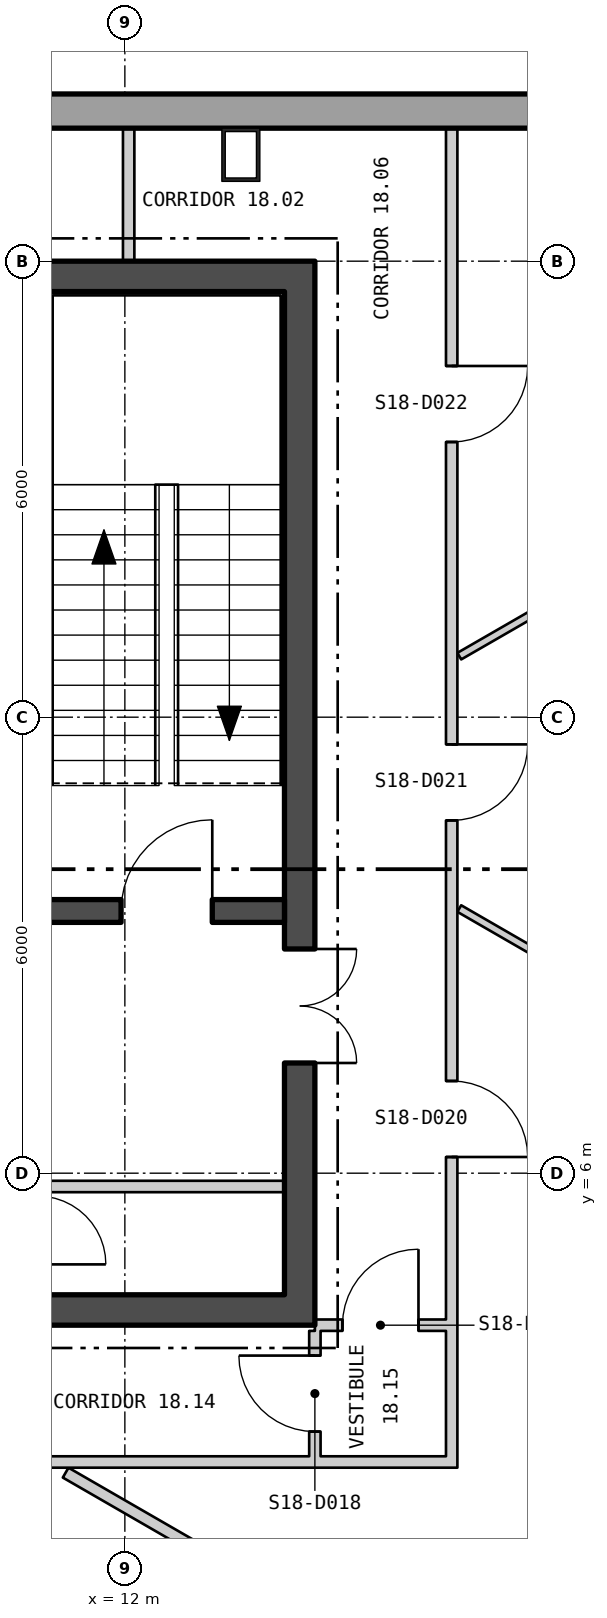
"""IFC4 building model, lengths in metres.
Left out: names, types, materials, properties, quantities, classifications, styles, units other than length and angle.
Written with IfcOpenShell. Run it as: python <this file> out.ifc"""

import sys

from ifc_helpers import new_model, si_unit, direction, frame, frame_2d, origin, origin_2d, place, context, subcontext, project, spatial, polyline, rectangle, hollow_rectangle, outline, extrude, element, fill, save


model = new_model("IFC4")
c1 = context("Model", 3, precision=1e-05, world=origin(), true_north=direction((0.0, 1.0)))
c2 = subcontext(c1, "Body", "Model", "MODEL_VIEW")
j1 = project(units=[si_unit("LENGTHUNIT", "METRE"), si_unit("PLANEANGLEUNIT", "RADIAN")], contexts=[c1])
p1 = place(None, origin())
s1 = spatial("IfcSite", under=j1, at=p1, CompositionType="ELEMENT")
p2 = place(p1, origin())
s2 = spatial("IfcBuilding", under=s1, at=p2, CompositionType="ELEMENT")
p3 = place(p2, frame((0.0, 0.0, 245.4)))
s3 = spatial("IfcBuildingStorey", under=s2, at=p3, CompositionType="ELEMENT", Elevation=245.4)
p4 = place(p3, frame((13.526, 19.4, 0.0), z_axis=(0.0, 0.0, 1.0), x_axis=(-1.0, 0.0, 0.0)))
e1 = element("IfcColumn", 1, at=p4, inside=s3, PredefinedType="COLUMN", context=c2, shape_type="SweptSolid", body=[
    extrude(hollow_rectangle(XDim=0.5, YDim=0.7, WallThickness=0.045, at=origin_2d()), origin(), (0.0, 0.0, 1.0), 3.9),
])
p5 = place(p3, frame((22.875, 19.975, -0.4), z_axis=(0.0, 0.0, 1.0), x_axis=(-1.0, 0.0, 0.0)))
e2 = element("IfcWall", 2, at=p5, inside=s3, PredefinedType="SOLIDWALL", context=c2, shape_type="SweptSolid", body=[
    extrude(outline(polyline([(-0.13, -0.225), (45.88, -0.225), (45.62, 0.225), (0.13, 0.225), (-0.13, -0.225)])), origin(), (0.0, 0.0, 1.0), 3.9),
])
p6 = place(p5, frame((1.425, 0.0, 1.3)))
e3 = element("IfcOpeningElement", 3, at=p6, cuts=e2, PredefinedType="OPENING", context=c2, shape_type="SweptSolid", body=[
    extrude(rectangle(XDim=2.4, YDim=2.0, at=frame_2d((1.2, 1.0))), frame((0.0, 0.235, 0.0), z_axis=(0.0, -1.0, 0.0), x_axis=(1.0, 0.0, 0.0)), (0.0, 0.0, 1.0), 0.47),
])
p7 = place(p5, frame((14.912, 0.0, 1.3)))
e4 = element("IfcOpeningElement", 4, at=p7, cuts=e2, PredefinedType="OPENING", context=c2, shape_type="SweptSolid", body=[
    extrude(rectangle(XDim=2.4, YDim=2.0, at=frame_2d((1.2, 1.0))), frame((0.0, 0.235, 0.0), z_axis=(0.0, -1.0, 0.0), x_axis=(1.0, 0.0, 0.0)), (0.0, 0.0, 1.0), 0.47),
])
p8 = place(p5, frame((19.421, 0.0, 1.3)))
e5 = element("IfcOpeningElement", 5, at=p8, cuts=e2, PredefinedType="OPENING", context=c2, shape_type="SweptSolid", body=[
    extrude(rectangle(XDim=2.4, YDim=2.0, at=frame_2d((1.2, 1.0))), frame((0.0, 0.235, 0.0), z_axis=(0.0, -1.0, 0.0), x_axis=(1.0, 0.0, 0.0)), (0.0, 0.0, 1.0), 0.47),
])
p9 = place(p5, frame((23.929, 0.0, 1.3)))
e6 = element("IfcOpeningElement", 6, at=p9, cuts=e2, PredefinedType="OPENING", context=c2, shape_type="SweptSolid", body=[
    extrude(rectangle(XDim=2.4, YDim=2.0, at=frame_2d((1.2, 1.0))), frame((0.0, 0.235, 0.0), z_axis=(0.0, -1.0, 0.0), x_axis=(1.0, 0.0, 0.0)), (0.0, 0.0, 1.0), 0.47),
])
p10 = place(p5, frame((28.438, 0.0, 1.3)))
e7 = element("IfcOpeningElement", 7, at=p10, cuts=e2, PredefinedType="OPENING", context=c2, shape_type="SweptSolid", body=[
    extrude(rectangle(XDim=2.4, YDim=2.0, at=frame_2d((1.2, 1.0))), frame((0.0, 0.235, 0.0), z_axis=(0.0, -1.0, 0.0), x_axis=(1.0, 0.0, 0.0)), (0.0, 0.0, 1.0), 0.47),
])
p11 = place(p5, frame((32.947, 0.0, 1.3)))
e8 = element("IfcOpeningElement", 8, at=p11, cuts=e2, PredefinedType="OPENING", context=c2, shape_type="SweptSolid", body=[
    extrude(rectangle(XDim=2.4, YDim=2.0, at=frame_2d((1.2, 1.0))), frame((0.0, 0.235, 0.0), z_axis=(0.0, -1.0, 0.0), x_axis=(1.0, 0.0, 0.0)), (0.0, 0.0, 1.0), 0.47),
])
p12 = place(p5, frame((41.925, 0.0, 1.3)))
e9 = element("IfcOpeningElement", 9, at=p12, cuts=e2, PredefinedType="OPENING", context=c2, shape_type="SweptSolid", body=[
    extrude(rectangle(XDim=2.4, YDim=2.0, at=frame_2d((1.2, 1.0))), frame((0.0, 0.235, 0.0), z_axis=(0.0, -1.0, 0.0), x_axis=(1.0, 0.0, 0.0)), (0.0, 0.0, 1.0), 0.47),
])
p13 = place(p3, frame((2.975, -24.799, -0.18), z_axis=(0.0, 0.0, 1.0), x_axis=(0.500000335318, 0.866025210188, 0.0)))
e10 = element("IfcWall", 10, at=p13, inside=s3, PredefinedType="SOLIDWALL", context=c2, shape_type="SweptSolid", body=[
    extrude(outline(polyline([(-0.13, -0.225), (45.88, -0.225), (45.62, 0.225), (0.13, 0.225), (-0.13, -0.225)])), origin(), (0.0, 0.0, 1.0), 3.68),
])
p14 = place(p13, frame((1.425, 0.0, 1.08)))
e11 = element("IfcOpeningElement", 11, at=p14, cuts=e10, PredefinedType="OPENING", context=c2, shape_type="SweptSolid", body=[
    extrude(rectangle(XDim=2.4, YDim=2.0, at=frame_2d((1.2, 1.0))), frame((0.0, 0.235, 0.0), z_axis=(0.0, -1.0, 0.0), x_axis=(1.0, 0.0, 0.0)), (0.0, 0.0, 1.0), 0.47),
])
p15 = place(p13, frame((5.895, 0.0, 1.08)))
e12 = element("IfcOpeningElement", 12, at=p15, cuts=e10, PredefinedType="OPENING", context=c2, shape_type="SweptSolid", body=[
    extrude(rectangle(XDim=2.4, YDim=2.0, at=frame_2d((1.2, 1.0))), frame((0.0, 0.235, 0.0), z_axis=(0.0, -1.0, 0.0), x_axis=(1.0, 0.0, 0.0)), (0.0, 0.0, 1.0), 0.47),
])
p16 = place(p13, frame((10.403, 0.0, 1.08)))
e13 = element("IfcOpeningElement", 13, at=p16, cuts=e10, PredefinedType="OPENING", context=c2, shape_type="SweptSolid", body=[
    extrude(rectangle(XDim=2.4, YDim=2.0, at=frame_2d((1.2, 1.0))), frame((0.0, 0.235, 0.0), z_axis=(0.0, -1.0, 0.0), x_axis=(1.0, 0.0, 0.0)), (0.0, 0.0, 1.0), 0.47),
])
p17 = place(p13, frame((14.912, 0.0, 1.08)))
e14 = element("IfcOpeningElement", 14, at=p17, cuts=e10, PredefinedType="OPENING", context=c2, shape_type="SweptSolid", body=[
    extrude(rectangle(XDim=2.4, YDim=2.0, at=frame_2d((1.2, 1.0))), frame((0.0, 0.235, 0.0), z_axis=(0.0, -1.0, 0.0), x_axis=(1.0, 0.0, 0.0)), (0.0, 0.0, 1.0), 0.47),
])
p18 = place(p13, frame((19.421, 0.0, 1.08)))
e15 = element("IfcOpeningElement", 15, at=p18, cuts=e10, PredefinedType="OPENING", context=c2, shape_type="SweptSolid", body=[
    extrude(rectangle(XDim=2.4, YDim=2.0, at=frame_2d((1.2, 1.0))), frame((0.0, 0.235, 0.0), z_axis=(0.0, -1.0, 0.0), x_axis=(1.0, 0.0, 0.0)), (0.0, 0.0, 1.0), 0.47),
])
p19 = place(p13, frame((23.929, 0.0, 1.08)))
e16 = element("IfcOpeningElement", 16, at=p19, cuts=e10, PredefinedType="OPENING", context=c2, shape_type="SweptSolid", body=[
    extrude(rectangle(XDim=2.4, YDim=2.0, at=frame_2d((1.2, 1.0))), frame((0.0, 0.235, 0.0), z_axis=(0.0, -1.0, 0.0), x_axis=(1.0, 0.0, 0.0)), (0.0, 0.0, 1.0), 0.47),
])
p20 = place(p13, frame((28.438, 0.0, 1.08)))
e17 = element("IfcOpeningElement", 17, at=p20, cuts=e10, PredefinedType="OPENING", context=c2, shape_type="SweptSolid", body=[
    extrude(rectangle(XDim=2.4, YDim=2.0, at=frame_2d((1.2, 1.0))), frame((0.0, 0.235, 0.0), z_axis=(0.0, -1.0, 0.0), x_axis=(1.0, 0.0, 0.0)), (0.0, 0.0, 1.0), 0.47),
])
p21 = place(p13, frame((32.947, 0.0, 1.08)))
e18 = element("IfcOpeningElement", 18, at=p21, cuts=e10, PredefinedType="OPENING", context=c2, shape_type="SweptSolid", body=[
    extrude(rectangle(XDim=2.4, YDim=2.0, at=frame_2d((1.2, 1.0))), frame((0.0, 0.235, 0.0), z_axis=(0.0, -1.0, 0.0), x_axis=(1.0, 0.0, 0.0)), (0.0, 0.0, 1.0), 0.47),
])
p22 = place(p13, frame((37.455, 0.0, 1.08)))
e19 = element("IfcOpeningElement", 19, at=p22, cuts=e10, PredefinedType="OPENING", context=c2, shape_type="SweptSolid", body=[
    extrude(rectangle(XDim=2.4, YDim=2.0, at=frame_2d((1.2, 1.0))), frame((0.0, 0.235, 0.0), z_axis=(0.0, -1.0, 0.0), x_axis=(1.0, 0.0, 0.0)), (0.0, 0.0, 1.0), 0.47),
])
p23 = place(p13, frame((41.925, 0.0, 1.08)))
e20 = element("IfcOpeningElement", 20, at=p23, cuts=e10, PredefinedType="OPENING", context=c2, shape_type="SweptSolid", body=[
    extrude(rectangle(XDim=2.4, YDim=2.0, at=frame_2d((1.2, 1.0))), frame((0.0, 0.235, 0.0), z_axis=(0.0, -1.0, 0.0), x_axis=(1.0, 0.0, 0.0)), (0.0, 0.0, 1.0), 0.47),
])
p24 = place(p3, frame((-14.5, 4.2, 0.0), z_axis=(0.0, 0.0, 1.0), x_axis=(1.0, 0.0, 0.0)))
e21 = element("IfcWall", 21, at=p24, inside=s3, PredefinedType="SHEAR", context=c2, shape_type="SweptSolid", body=[
    extrude(rectangle(XDim=29.0, YDim=0.4, at=frame_2d((14.5, 0.0))), origin(), (0.0, 0.0, 1.0), 3.7),
])
p25 = place(p24, frame((9.0, 0.0, 0.0)))
e22 = element("IfcOpeningElement", 22, at=p25, cuts=e21, PredefinedType="OPENING", context=c2, shape_type="SweptSolid", body=[
    extrude(rectangle(XDim=1.8, YDim=2.4, at=frame_2d((0.9, 1.2))), frame((0.0, 0.21, 0.0), z_axis=(0.0, -1.0, 0.0), x_axis=(1.0, 0.0, 0.0)), (0.0, 0.0, 1.0), 0.42),
])
p26 = place(p24, frame((19.0, 0.0, 0.0)))
e23 = element("IfcOpeningElement", 23, at=p26, cuts=e21, PredefinedType="OPENING", context=c2, shape_type="SweptSolid", body=[
    extrude(rectangle(XDim=1.8, YDim=2.4, at=frame_2d((0.9, 1.2))), frame((0.0, 0.21, 0.0), z_axis=(0.0, -1.0, 0.0), x_axis=(1.0, 0.0, 0.0)), (0.0, 0.0, 1.0), 0.42),
])
p27 = place(p3, frame((-14.5, 17.8, 0.0), z_axis=(0.0, 0.0, 1.0), x_axis=(1.0, 0.0, 0.0)))
e24 = element("IfcWall", 24, at=p27, inside=s3, PredefinedType="SHEAR", context=c2, shape_type="SweptSolid", body=[
    extrude(rectangle(XDim=29.0, YDim=0.4, at=frame_2d((14.5, 0.0))), origin(), (0.0, 0.0, 1.0), 3.7),
])
p28 = place(p3, frame((14.3, 4.4, 0.0), z_axis=(0.0, 0.0, 1.0), x_axis=(0.0, 1.0, 0.0)))
e25 = element("IfcWall", 25, at=p28, inside=s3, PredefinedType="SHEAR", context=c2, shape_type="SweptSolid", body=[
    extrude(rectangle(XDim=13.2, YDim=0.4, at=frame_2d((6.6, 0.0))), origin(), (0.0, 0.0, 1.0), 3.7),
])
p29 = place(p28, frame((3.05, 0.0, 0.0)))
e26 = element("IfcOpeningElement", 26, at=p29, cuts=e25, PredefinedType="OPENING", context=c2, shape_type="SweptSolid", body=[
    extrude(rectangle(XDim=1.5, YDim=2.1, at=frame_2d((0.75, 1.05))), frame((0.0, 0.21, 0.0), z_axis=(0.0, -1.0, 0.0), x_axis=(1.0, 0.0, 0.0)), (0.0, 0.0, 1.0), 0.42),
])
p30 = place(p3, frame((11.0, 9.45, 0.0), z_axis=(0.0, 0.0, 1.0), x_axis=(1.0, 0.0, 0.0)))
e27 = element("IfcWall", 27, at=p30, inside=s3, PredefinedType="SHEAR", context=c2, shape_type="SweptSolid", body=[
    extrude(rectangle(XDim=3.1, YDim=0.3, at=frame_2d((1.55, 0.0))), origin(), (0.0, 0.0, 1.0), 3.7),
])
p31 = place(p30, frame((0.95, 0.0, 0.0)))
e28 = element("IfcOpeningElement", 28, at=p31, cuts=e27, PredefinedType="OPENING", context=c2, shape_type="SweptSolid", body=[
    extrude(rectangle(XDim=1.2, YDim=2.1, at=frame_2d((0.6, 1.05))), frame((0.0, 0.16, 0.0), z_axis=(0.0, -1.0, 0.0), x_axis=(1.0, 0.0, 0.0)), (0.0, 0.0, 1.0), 0.32),
])
p32 = place(p3, frame((11.0, 5.825, 0.0), z_axis=(0.0, 0.0, 1.0), x_axis=(1.0, 0.0, 0.0)))
e29 = element("IfcWall", 29, at=p32, inside=s3, PredefinedType="PARTITIONING", context=c2, shape_type="SweptSolid", body=[
    extrude(rectangle(XDim=3.1, YDim=0.15, at=frame_2d((1.55, 0.0))), origin(), (0.0, 0.0, 1.0), 3.7),
])
p33 = place(p3, frame((8.025, 2.2, 0.0), z_axis=(0.0, 0.0, 1.0), x_axis=(1.0, 0.0, 0.0)))
e30 = element("IfcWall", 30, at=p33, inside=s3, PredefinedType="PARTITIONING", context=c2, shape_type="SweptSolid", body=[
    extrude(rectangle(XDim=8.2, YDim=0.15, at=frame_2d((4.1, 0.0))), origin(), (0.0, 0.0, 1.0), 3.7),
])
p34 = place(p3, frame((11.221, 2.06, 0.0), z_axis=(0.0, 0.0, 1.0), x_axis=(0.866108468144, -0.499856100702, 0.0)))
e31 = element("IfcWall", 31, at=p34, inside=s3, PredefinedType="PARTITIONING", context=c2, shape_type="SweptSolid", body=[
    extrude(rectangle(XDim=5.614, YDim=0.15, at=frame_2d((2.807, 0.0))), origin(), (0.0, 0.0, 1.0), 3.7),
])
p35 = place(p3, frame((12.05, 18.0, 0.0), z_axis=(0.0, 0.0, 1.0), x_axis=(0.0, 1.0, 0.0)))
e32 = element("IfcWall", 32, at=p35, inside=s3, PredefinedType="PARTITIONING", context=c2, shape_type="SweptSolid", body=[
    extrude(rectangle(XDim=1.75, YDim=0.15, at=frame_2d((0.875, 0.0))), origin(), (0.0, 0.0, 1.0), 3.7),
])
p36 = place(p3, frame((14.5, 2.275, 0.0), z_axis=(0.0, 0.0, 1.0), x_axis=(0.0, 1.0, 0.0)))
e33 = element("IfcWall", 33, at=p36, inside=s3, PredefinedType="PARTITIONING", context=c2, shape_type="SweptSolid", body=[
    extrude(rectangle(XDim=1.65, YDim=0.15, at=frame_2d((0.825, 0.0))), origin(), (0.0, 0.0, 1.0), 3.7),
])
p37 = place(p36, frame((0.325, 0.0, 0.0)))
e34 = element("IfcOpeningElement", 34, at=p37, cuts=e33, PredefinedType="OPENING", context=c2, shape_type="SweptSolid", body=[
    extrude(rectangle(XDim=1.0, YDim=2.1, at=frame_2d((0.5, 1.05))), frame((0.0, 0.085, 0.0), z_axis=(0.0, -1.0, 0.0), x_axis=(1.0, 0.0, 0.0)), (0.0, 0.0, 1.0), 0.17),
])
p38 = place(p3, frame((14.5, 4.0, 0.0), z_axis=(0.0, 0.0, 1.0), x_axis=(1.0, 0.0, 0.0)))
e35 = element("IfcWall", 35, at=p38, inside=s3, PredefinedType="PARTITIONING", context=c2, shape_type="SweptSolid", body=[
    extrude(rectangle(XDim=1.725, YDim=0.15, at=frame_2d((0.863, 0.0))), origin(), (0.0, 0.0, 1.0), 3.16),
])
p39 = place(p38, frame((0.363, 0.0, 0.0)))
e36 = element("IfcOpeningElement", 36, at=p39, cuts=e35, PredefinedType="OPENING", context=c2, shape_type="SweptSolid", body=[
    extrude(rectangle(XDim=1.0, YDim=2.1, at=frame_2d((0.5, 1.05))), frame((0.0, 0.085, 0.0), z_axis=(0.0, -1.0, 0.0), x_axis=(1.0, 0.0, 0.0)), (0.0, 0.0, 1.0), 0.17),
])
p40 = place(p3, frame((16.3, 2.125, 0.0), z_axis=(0.0, 0.0, 1.0), x_axis=(0.0, 1.0, 0.0)))
e37 = element("IfcWall", 37, at=p40, inside=s3, PredefinedType="PARTITIONING", context=c2, shape_type="SweptSolid", body=[
    extrude(rectangle(XDim=17.622, YDim=0.15, at=frame_2d((8.811, 0.0))), origin(), (0.0, 0.0, 1.0), 3.7),
])
p41 = place(p40, frame((4.088, 0.0, 0.0)))
e38 = element("IfcOpeningElement", 38, at=p41, cuts=e37, PredefinedType="OPENING", context=c2, shape_type="SweptSolid", body=[
    extrude(rectangle(XDim=1.0, YDim=2.1, at=frame_2d((0.5, 1.05))), frame((0.0, 0.085, 0.0), z_axis=(0.0, -1.0, 0.0), x_axis=(1.0, 0.0, 0.0)), (0.0, 0.0, 1.0), 0.17),
])
p42 = place(p40, frame((8.517, 0.0, 0.0)))
e39 = element("IfcOpeningElement", 39, at=p42, cuts=e37, PredefinedType="OPENING", context=c2, shape_type="SweptSolid", body=[
    extrude(rectangle(XDim=1.0, YDim=2.1, at=frame_2d((0.5, 1.05))), frame((0.0, 0.085, 0.0), z_axis=(0.0, -1.0, 0.0), x_axis=(1.0, 0.0, 0.0)), (0.0, 0.0, 1.0), 0.17),
])
p43 = place(p40, frame((13.496, 0.0, 0.0)))
e40 = element("IfcOpeningElement", 40, at=p43, cuts=e37, PredefinedType="OPENING", context=c2, shape_type="SweptSolid", body=[
    extrude(rectangle(XDim=1.0, YDim=2.1, at=frame_2d((0.5, 1.05))), frame((0.0, 0.085, 0.0), z_axis=(0.0, -1.0, 0.0), x_axis=(1.0, 0.0, 0.0)), (0.0, 0.0, 1.0), 0.17),
])
p44 = place(p3, frame((16.4, 12.803, 0.0), z_axis=(0.0, 0.0, 1.0), x_axis=(0.866341220787, 0.499452589508, 0.0)))
e41 = element("IfcWall", 41, at=p44, inside=s3, PredefinedType="PARTITIONING", context=c2, shape_type="SweptSolid", body=[
    extrude(rectangle(XDim=1.818, YDim=0.1, at=frame_2d((0.909, 0.0))), origin(), (0.0, 0.0, 1.0), 3.7),
])
p45 = place(p3, frame((16.4, 9.482, 0.0), z_axis=(0.0, 0.0, 1.0), x_axis=(0.866085797004, -0.499895381282, 0.0)))
e42 = element("IfcWall", 42, at=p45, inside=s3, PredefinedType="PARTITIONING", context=c2, shape_type="SweptSolid", body=[
    extrude(rectangle(XDim=4.839, YDim=0.1, at=frame_2d((2.42, 0.0))), origin(), (0.0, 0.0, 1.0), 3.7),
])
p46 = place(p20, origin())
e43 = element("IfcWindow", 43, at=p46, inside=s3, PartitioningType="SINGLE_PANEL", PredefinedType="WINDOW", context=c2, shape_type="SweptSolid", body=[
    extrude(rectangle(XDim=2.4, YDim=2.0, at=frame_2d((1.2, 1.0))), frame((0.0, 0.105, 0.0), z_axis=(0.0, -1.0, 0.0), x_axis=(1.0, 0.0, 0.0)), (0.0, 0.0, 1.0), 0.06),
])
fill(e17, e43)
p47 = place(p31, origin())
e44 = element("IfcDoor", 44, at=p47, inside=s3, OperationType="SINGLE_SWING_LEFT", PredefinedType="DOOR", context=c2, shape_type="SweptSolid", body=[
    extrude(rectangle(XDim=1.2, YDim=2.1, at=frame_2d((0.6, 1.05))), frame((0.0, 0.025, 0.0), z_axis=(0.0, -1.0, 0.0), x_axis=(1.0, 0.0, 0.0)), (0.0, 0.0, 1.0), 0.05),
])
fill(e28, e44)
p48 = place(p29, origin())
e45 = element("IfcDoor", 45, at=p48, inside=s3, OperationType="DOUBLE_DOOR_SINGLE_SWING", PredefinedType="DOOR", context=c2, shape_type="SweptSolid", body=[
    extrude(rectangle(XDim=1.5, YDim=2.1, at=frame_2d((0.75, 1.05))), frame((0.0, 0.025, 0.0), z_axis=(0.0, -1.0, 0.0), x_axis=(1.0, 0.0, 0.0)), (0.0, 0.0, 1.0), 0.05),
])
fill(e26, e45)
p49 = place(p37, origin())
e46 = element("IfcDoor", 46, at=p49, inside=s3, OperationType="SINGLE_SWING_LEFT", PredefinedType="DOOR", context=c2, shape_type="SweptSolid", body=[
    extrude(rectangle(XDim=1.0, YDim=2.1, at=frame_2d((0.5, 1.05))), frame((0.0, 0.025, 0.0), z_axis=(0.0, -1.0, 0.0), x_axis=(1.0, 0.0, 0.0)), (0.0, 0.0, 1.0), 0.05),
])
fill(e34, e46)
p50 = place(p39, origin())
e47 = element("IfcDoor", 47, at=p50, inside=s3, OperationType="SINGLE_SWING_LEFT", PredefinedType="DOOR", context=c2, shape_type="SweptSolid", body=[
    extrude(rectangle(XDim=1.0, YDim=2.1, at=frame_2d((0.5, 1.05))), frame((0.0, 0.025, 0.0), z_axis=(0.0, -1.0, 0.0), x_axis=(1.0, 0.0, 0.0)), (0.0, 0.0, 1.0), 0.05),
])
fill(e36, e47)
p51 = place(p41, origin())
e48 = element("IfcDoor", 48, at=p51, inside=s3, OperationType="SINGLE_SWING_LEFT", PredefinedType="DOOR", context=c2, shape_type="SweptSolid", body=[
    extrude(rectangle(XDim=1.0, YDim=2.1, at=frame_2d((0.5, 1.05))), frame((0.0, 0.025, 0.0), z_axis=(0.0, -1.0, 0.0), x_axis=(1.0, 0.0, 0.0)), (0.0, 0.0, 1.0), 0.05),
])
fill(e38, e48)
p52 = place(p42, origin())
e49 = element("IfcDoor", 49, at=p52, inside=s3, OperationType="SINGLE_SWING_RIGHT", PredefinedType="DOOR", context=c2, shape_type="SweptSolid", body=[
    extrude(rectangle(XDim=1.0, YDim=2.1, at=frame_2d((0.5, 1.05))), frame((0.0, 0.025, 0.0), z_axis=(0.0, -1.0, 0.0), x_axis=(1.0, 0.0, 0.0)), (0.0, 0.0, 1.0), 0.05),
])
fill(e39, e49)
p53 = place(p43, origin())
e50 = element("IfcDoor", 50, at=p53, inside=s3, OperationType="SINGLE_SWING_RIGHT", PredefinedType="DOOR", context=c2, shape_type="SweptSolid", body=[
    extrude(rectangle(XDim=1.0, YDim=2.1, at=frame_2d((0.5, 1.05))), frame((0.0, 0.025, 0.0), z_axis=(0.0, -1.0, 0.0), x_axis=(1.0, 0.0, 0.0)), (0.0, 0.0, 1.0), 0.05),
])
fill(e40, e50)
save(model, sys.argv[1])
